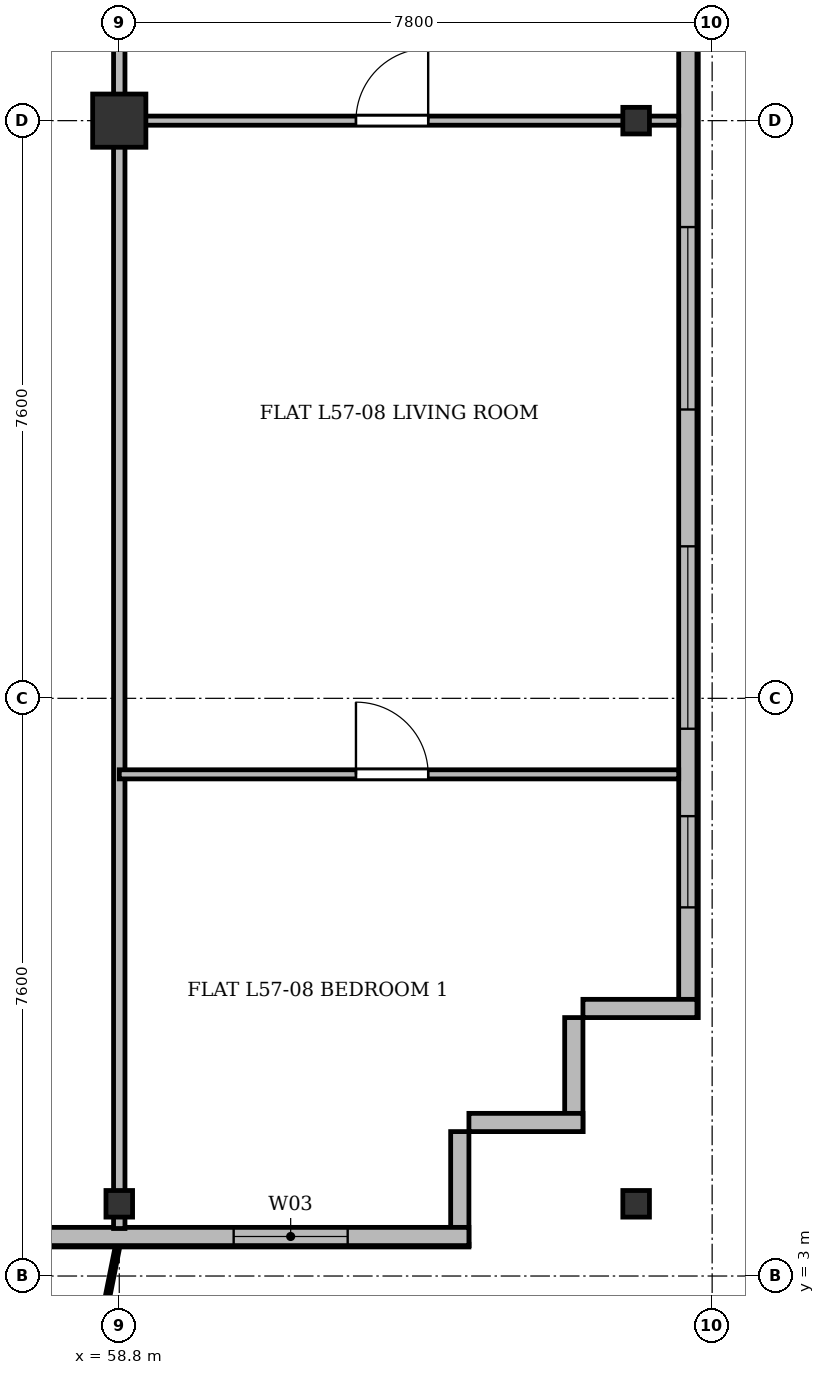
"""IFC4 building model, lengths in metres.
Left out: names, types, materials, properties, quantities, classifications, styles, units other than length and angle.
Written with IfcOpenShell. Run it as: python <this file> out.ifc"""

import sys

from ifc_helpers import new_model, si_unit, direction, frame, frame_2d, origin, origin_2d, place, context, subcontext, project, spatial, rectangle, i_section, extrude, source, transform, mapped, element, fill, save


model = new_model("IFC4")
c1 = context("Model", 3, precision=1e-05, world=origin(), true_north=direction((0.0, 1.0)))
c2 = subcontext(c1, "Body", "Model", "MODEL_VIEW")
j1 = project(units=[si_unit("LENGTHUNIT", "METRE"), si_unit("PLANEANGLEUNIT", "RADIAN")], contexts=[c1])
p1 = place(None, origin())
s1 = spatial("IfcSite", under=j1, at=p1, CompositionType="ELEMENT")
p2 = place(p1, origin())
s2 = spatial("IfcBuilding", under=s1, at=p2, CompositionType="ELEMENT")
p3 = place(p2, frame((0.0, 0.0, 219.3)))
s3 = spatial("IfcBuildingStorey", under=s2, at=p3, CompositionType="ELEMENT", Elevation=219.3)
m1 = source(origin(), c2, "Body", "SweptSolid", [
    extrude(i_section(OverallWidth=0.35, OverallDepth=0.35, WebThickness=0.018, FlangeThickness=0.028, at=origin_2d()), origin(), (0.0, 0.0, 1.0), 3.6),
])
p4 = place(p3, frame((58.8, 3.95, 0.0), z_axis=(0.0, 0.0, 1.0), x_axis=(1.0, 0.0, 0.0)))
e1 = element("IfcColumn", 1, at=p4, inside=s3, PredefinedType="COLUMN", context=c2, shape_type="MappedRepresentation", body=[
    mapped(m1, transform((0.0, 0.0, 0.0), x_axis=(1.0, 0.0, 0.0), y_axis=(0.0, 1.0, 0.0), z_axis=(0.0, 0.0, 1.0), scale=1.0)),
])
m2 = source(origin(), c2, "Body", "SweptSolid", [
    extrude(rectangle(XDim=0.7, YDim=0.7, at=origin_2d()), origin(), (0.0, 0.0, 1.0), 3.6),
])
p5 = place(p3, frame((58.8, 18.2, 0.0), z_axis=(0.0, 0.0, 1.0), x_axis=(1.0, 0.0, 0.0)))
e2 = element("IfcColumn", 2, at=p5, inside=s3, PredefinedType="COLUMN", context=c2, shape_type="MappedRepresentation", body=[
    mapped(m2, transform((0.0, 0.0, 0.0), x_axis=(1.0, 0.0, 0.0), y_axis=(0.0, 1.0, 0.0), z_axis=(0.0, 0.0, 1.0), scale=1.0)),
])
for number, where, z_axis, x_axis in (
    (3, (65.6, 3.95, 0.0), (0.0, 0.0, 1.0), (1.0, 0.0, 0.0)),
    (4, (65.6, 18.2, 0.0), (0.0, 0.0, 1.0), (1.0, 0.0, 0.0)),
):
    element("IfcColumn", number, at=place(p3, frame(where, z_axis=z_axis, x_axis=x_axis)), inside=s3, PredefinedType="COLUMN", context=c2, shape_type="MappedRepresentation", body=[
        mapped(m1, transform((0.0, 0.0, 0.0), x_axis=(1.0, 0.0, 0.0), y_axis=(0.0, 1.0, 0.0), z_axis=(0.0, 0.0, 1.0), scale=1.0)),
    ])
p6 = place(p3, frame((66.28, 45.5, 0.0), z_axis=(0.0, 0.0, 1.0), x_axis=(0.0, -1.0, 0.0)))
e5 = element("IfcWall", 5, at=p6, inside=s3, PredefinedType="SOLIDWALL", context=c2, shape_type="SweptSolid", body=[
    extrude(rectangle(XDim=39.1, YDim=0.24, at=frame_2d((19.55, 0.0))), origin(), (0.0, 0.0, 1.0), 3.36),
])
p7 = place(p6, frame((36.45, 0.0, 0.92)))
e6 = element("IfcOpeningElement", 6, at=p7, cuts=e5, PredefinedType="OPENING", context=c2, shape_type="SweptSolid", body=[
    extrude(rectangle(XDim=1.2, YDim=1.65, at=frame_2d((0.6, 0.825))), frame((0.0, 0.13, 0.0), z_axis=(0.0, -1.0, 0.0), x_axis=(1.0, 0.0, 0.0)), (0.0, 0.0, 1.0), 0.26),
])
p8 = place(p6, frame((32.9, 0.0, 0.92)))
e7 = element("IfcOpeningElement", 7, at=p8, cuts=e5, PredefinedType="OPENING", context=c2, shape_type="SweptSolid", body=[
    extrude(rectangle(XDim=2.4, YDim=2.1, at=frame_2d((1.2, 1.05))), frame((0.0, 0.13, 0.0), z_axis=(0.0, -1.0, 0.0), x_axis=(1.0, 0.0, 0.0)), (0.0, 0.0, 1.0), 0.26),
])
p9 = place(p6, frame((28.7, 0.0, 0.92)))
e8 = element("IfcOpeningElement", 8, at=p9, cuts=e5, PredefinedType="OPENING", context=c2, shape_type="SweptSolid", body=[
    extrude(rectangle(XDim=2.4, YDim=2.1, at=frame_2d((1.2, 1.05))), frame((0.0, 0.13, 0.0), z_axis=(0.0, -1.0, 0.0), x_axis=(1.0, 0.0, 0.0)), (0.0, 0.0, 1.0), 0.26),
])
p10 = place(p6, frame((21.5, 0.0, 0.92)))
e9 = element("IfcOpeningElement", 9, at=p10, cuts=e5, PredefinedType="OPENING", context=c2, shape_type="SweptSolid", body=[
    extrude(rectangle(XDim=2.4, YDim=2.1, at=frame_2d((1.2, 1.05))), frame((0.0, 0.13, 0.0), z_axis=(0.0, -1.0, 0.0), x_axis=(1.0, 0.0, 0.0)), (0.0, 0.0, 1.0), 0.26),
])
p11 = place(p6, frame((7.5, 0.0, 0.92)))
e10 = element("IfcOpeningElement", 10, at=p11, cuts=e5, PredefinedType="OPENING", context=c2, shape_type="SweptSolid", body=[
    extrude(rectangle(XDim=2.4, YDim=2.1, at=frame_2d((1.2, 1.05))), frame((0.0, 0.13, 0.0), z_axis=(0.0, -1.0, 0.0), x_axis=(1.0, 0.0, 0.0)), (0.0, 0.0, 1.0), 0.26),
])
p12 = place(p6, frame((4.5, 0.0, 0.92)))
e11 = element("IfcOpeningElement", 11, at=p12, cuts=e5, PredefinedType="OPENING", context=c2, shape_type="SweptSolid", body=[
    extrude(rectangle(XDim=1.2, YDim=1.65, at=frame_2d((0.6, 0.825))), frame((0.0, 0.13, 0.0), z_axis=(0.0, -1.0, 0.0), x_axis=(1.0, 0.0, 0.0)), (0.0, 0.0, 1.0), 0.26),
])
p13 = place(p6, frame((1.15, 0.0, 0.92)))
e12 = element("IfcOpeningElement", 12, at=p13, cuts=e5, PredefinedType="OPENING", context=c2, shape_type="SweptSolid", body=[
    extrude(rectangle(XDim=1.2, YDim=1.65, at=frame_2d((0.6, 0.825))), frame((0.0, 0.13, 0.0), z_axis=(0.0, -1.0, 0.0), x_axis=(1.0, 0.0, 0.0)), (0.0, 0.0, 1.0), 0.26),
])
p14 = place(p3, frame((66.4, 6.52, 0.0), z_axis=(0.0, 0.0, 1.0), x_axis=(-1.0, 0.0, 0.0)))
e13 = element("IfcWall", 13, at=p14, inside=s3, PredefinedType="SOLIDWALL", context=c2, shape_type="SweptSolid", body=[
    extrude(rectangle(XDim=1.5, YDim=0.24, at=frame_2d((0.75, 0.0))), origin(), (0.0, 0.0, 1.0), 2.86),
])
for number, where, z_axis, x_axis in (
    (14, (64.78, 6.4, 0.0), (0.0, 0.0, 1.0), (0.0, -1.0, 0.0)),
    (15, (64.9, 5.02, 0.0), (0.0, 0.0, 1.0), (-1.0, 0.0, 0.0)),
):
    element("IfcWall", number, at=place(p3, frame(where, z_axis=z_axis, x_axis=x_axis)), inside=s3, PredefinedType="SOLIDWALL", context=c2, shape_type="SweptSolid", body=[
        extrude(rectangle(XDim=1.5, YDim=0.24, at=frame_2d((0.75, 0.0))), origin(), (0.0, 0.0, 1.0), 3.36),
    ])
p15 = place(p3, frame((63.28, 4.9, 0.0), z_axis=(0.0, 0.0, 1.0), x_axis=(0.0, -1.0, 0.0)))
e16 = element("IfcWall", 16, at=p15, inside=s3, PredefinedType="SOLIDWALL", context=c2, shape_type="SweptSolid", body=[
    extrude(rectangle(XDim=1.5, YDim=0.24, at=frame_2d((0.75, 0.0))), origin(), (0.0, 0.0, 1.0), 2.91),
])
p16 = place(p3, frame((63.4, 3.52, 0.0), z_axis=(0.0, 0.0, 1.0), x_axis=(-1.0, 0.0, 0.0)))
e17 = element("IfcWall", 17, at=p16, inside=s3, PredefinedType="SOLIDWALL", context=c2, shape_type="SweptSolid", body=[
    extrude(rectangle(XDim=52.4, YDim=0.24, at=frame_2d((26.2, 0.0))), origin(), (0.0, 0.0, 1.0), 3.36),
])
p17 = place(p16, frame((1.595, 0.0, 0.9)))
e18 = element("IfcOpeningElement", 18, at=p17, cuts=e17, PredefinedType="OPENING", context=c2, shape_type="SweptSolid", body=[
    extrude(rectangle(XDim=1.5, YDim=1.75, at=frame_2d((0.75, 0.875))), frame((0.0, 0.13, 0.0), z_axis=(0.0, -1.0, 0.0), x_axis=(1.0, 0.0, 0.0)), (0.0, 0.0, 1.0), 0.26),
])
p18 = place(p16, frame((7.5, 0.0, 0.9)))
e19 = element("IfcOpeningElement", 19, at=p18, cuts=e17, PredefinedType="OPENING", context=c2, shape_type="SweptSolid", body=[
    extrude(rectangle(XDim=2.0, YDim=1.95, at=frame_2d((1.0, 0.975))), frame((0.0, 0.13, 0.0), z_axis=(0.0, -1.0, 0.0), x_axis=(1.0, 0.0, 0.0)), (0.0, 0.0, 1.0), 0.26),
])
p19 = place(p16, frame((13.42, 0.0, 0.0)))
e20 = element("IfcOpeningElement", 20, at=p19, cuts=e17, PredefinedType="OPENING", context=c2, shape_type="SweptSolid", body=[
    extrude(rectangle(XDim=1.2, YDim=2.2, at=frame_2d((0.6, 1.1))), frame((0.0, 0.13, 0.0), z_axis=(0.0, -1.0, 0.0), x_axis=(1.0, 0.0, 0.0)), (0.0, 0.0, 1.0), 0.26),
])
p20 = place(p16, frame((15.1, 0.0, 0.9)))
e21 = element("IfcOpeningElement", 21, at=p20, cuts=e17, PredefinedType="OPENING", context=c2, shape_type="SweptSolid", body=[
    extrude(rectangle(XDim=1.8, YDim=1.8, at=frame_2d((0.9, 0.9))), frame((0.0, 0.13, 0.0), z_axis=(0.0, -1.0, 0.0), x_axis=(1.0, 0.0, 0.0)), (0.0, 0.0, 1.0), 0.26),
])
p21 = place(p16, frame((17.65, 0.0, 0.9)))
e22 = element("IfcOpeningElement", 22, at=p21, cuts=e17, PredefinedType="OPENING", context=c2, shape_type="SweptSolid", body=[
    extrude(rectangle(XDim=1.5, YDim=1.75, at=frame_2d((0.75, 0.875))), frame((0.0, 0.13, 0.0), z_axis=(0.0, -1.0, 0.0), x_axis=(1.0, 0.0, 0.0)), (0.0, 0.0, 1.0), 0.26),
])
p22 = place(p16, frame((20.5, 0.0, 0.9)))
e23 = element("IfcOpeningElement", 23, at=p22, cuts=e17, PredefinedType="OPENING", context=c2, shape_type="SweptSolid", body=[
    extrude(rectangle(XDim=1.5, YDim=1.75, at=frame_2d((0.75, 0.875))), frame((0.0, 0.13, 0.0), z_axis=(0.0, -1.0, 0.0), x_axis=(1.0, 0.0, 0.0)), (0.0, 0.0, 1.0), 0.26),
])
p23 = place(p16, frame((23.55, 0.0, 0.9)))
e24 = element("IfcOpeningElement", 24, at=p23, cuts=e17, PredefinedType="OPENING", context=c2, shape_type="SweptSolid", body=[
    extrude(rectangle(XDim=2.0, YDim=1.95, at=frame_2d((1.0, 0.975))), frame((0.0, 0.13, 0.0), z_axis=(0.0, -1.0, 0.0), x_axis=(1.0, 0.0, 0.0)), (0.0, 0.0, 1.0), 0.26),
])
p24 = place(p16, frame((28.675, 0.0, 0.9)))
e25 = element("IfcOpeningElement", 25, at=p24, cuts=e17, PredefinedType="OPENING", context=c2, shape_type="SweptSolid", body=[
    extrude(rectangle(XDim=1.65, YDim=1.85, at=frame_2d((0.825, 0.925))), frame((0.0, 0.13, 0.0), z_axis=(0.0, -1.0, 0.0), x_axis=(1.0, 0.0, 0.0)), (0.0, 0.0, 1.0), 0.26),
])
p25 = place(p16, frame((33.7, 0.0, 0.9)))
e26 = element("IfcOpeningElement", 26, at=p25, cuts=e17, PredefinedType="OPENING", context=c2, shape_type="SweptSolid", body=[
    extrude(rectangle(XDim=1.8, YDim=1.8, at=frame_2d((0.9, 0.9))), frame((0.0, 0.13, 0.0), z_axis=(0.0, -1.0, 0.0), x_axis=(1.0, 0.0, 0.0)), (0.0, 0.0, 1.0), 0.26),
])
p26 = place(p16, frame((37.1, 0.0, 0.9)))
e27 = element("IfcOpeningElement", 27, at=p26, cuts=e17, PredefinedType="OPENING", context=c2, shape_type="SweptSolid", body=[
    extrude(rectangle(XDim=2.2, YDim=1.8, at=frame_2d((1.1, 0.9))), frame((0.0, 0.13, 0.0), z_axis=(0.0, -1.0, 0.0), x_axis=(1.0, 0.0, 0.0)), (0.0, 0.0, 1.0), 0.26),
])
p27 = place(p16, frame((41.09, 0.0, 0.0)))
e28 = element("IfcOpeningElement", 28, at=p27, cuts=e17, PredefinedType="OPENING", context=c2, shape_type="SweptSolid", body=[
    extrude(rectangle(XDim=1.2, YDim=2.2, at=frame_2d((0.6, 1.1))), frame((0.0, 0.13, 0.0), z_axis=(0.0, -1.0, 0.0), x_axis=(1.0, 0.0, 0.0)), (0.0, 0.0, 1.0), 0.26),
])
p28 = place(p16, frame((42.9, 0.0, 0.9)))
e29 = element("IfcOpeningElement", 29, at=p28, cuts=e17, PredefinedType="OPENING", context=c2, shape_type="SweptSolid", body=[
    extrude(rectangle(XDim=2.0, YDim=1.95, at=frame_2d((1.0, 0.975))), frame((0.0, 0.13, 0.0), z_axis=(0.0, -1.0, 0.0), x_axis=(1.0, 0.0, 0.0)), (0.0, 0.0, 1.0), 0.26),
])
p29 = place(p16, frame((45.675, 0.0, 0.9)))
e30 = element("IfcOpeningElement", 30, at=p29, cuts=e17, PredefinedType="OPENING", context=c2, shape_type="SweptSolid", body=[
    extrude(rectangle(XDim=1.65, YDim=1.85, at=frame_2d((0.825, 0.925))), frame((0.0, 0.13, 0.0), z_axis=(0.0, -1.0, 0.0), x_axis=(1.0, 0.0, 0.0)), (0.0, 0.0, 1.0), 0.26),
])
p30 = place(p16, frame((49.155, 0.0, 0.9)))
e31 = element("IfcOpeningElement", 31, at=p30, cuts=e17, PredefinedType="OPENING", context=c2, shape_type="SweptSolid", body=[
    extrude(rectangle(XDim=1.8, YDim=1.8, at=frame_2d((0.9, 0.9))), frame((0.0, 0.13, 0.0), z_axis=(0.0, -1.0, 0.0), x_axis=(1.0, 0.0, 0.0)), (0.0, 0.0, 1.0), 0.26),
])
p31 = place(p3, frame((58.8, 3.625, 0.0), z_axis=(0.0, 0.0, 1.0), x_axis=(0.0, 1.0, 0.0)))
e32 = element("IfcWall", 32, at=p31, inside=s3, PredefinedType="PARTITIONING", context=c2, shape_type="SweptSolid", body=[
    extrude(rectangle(XDim=27.375, YDim=0.15, at=frame_2d((13.688, 0.0))), origin(), (0.0, 0.0, 1.0), 2.86),
])
p32 = place(p3, frame((58.8, 18.2, 0.0), z_axis=(0.0, 0.0, 1.0), x_axis=(1.0, 0.0, 0.0)))
e33 = element("IfcWall", 33, at=p32, inside=s3, PredefinedType="PARTITIONING", context=c2, shape_type="SweptSolid", body=[
    extrude(rectangle(XDim=7.36, YDim=0.12, at=frame_2d((3.68, 0.0))), origin(), (0.0, 0.0, 1.0), 2.91),
])
p33 = place(p32, frame((3.114, 0.0, 0.0)))
e34 = element("IfcOpeningElement", 34, at=p33, cuts=e33, PredefinedType="OPENING", context=c2, shape_type="SweptSolid", body=[
    extrude(rectangle(XDim=0.95, YDim=2.15, at=frame_2d((0.475, 1.075))), frame((0.0, 0.07, 0.0), z_axis=(0.0, -1.0, 0.0), x_axis=(1.0, 0.0, 0.0)), (0.0, 0.0, 1.0), 0.14),
])
p34 = place(p3, frame((58.8, 9.6, 0.0), z_axis=(0.0, 0.0, 1.0), x_axis=(1.0, 0.0, 0.0)))
e35 = element("IfcWall", 35, at=p34, inside=s3, PredefinedType="PARTITIONING", context=c2, shape_type="SweptSolid", body=[
    extrude(rectangle(XDim=7.36, YDim=0.12, at=frame_2d((3.68, 0.0))), origin(), (0.0, 0.0, 1.0), 2.86),
])
p35 = place(p34, frame((3.114, 0.0, 0.0)))
e36 = element("IfcOpeningElement", 36, at=p35, cuts=e35, PredefinedType="OPENING", context=c2, shape_type="SweptSolid", body=[
    extrude(rectangle(XDim=0.95, YDim=2.15, at=frame_2d((0.475, 1.075))), frame((0.0, 0.07, 0.0), z_axis=(0.0, -1.0, 0.0), x_axis=(1.0, 0.0, 0.0)), (0.0, 0.0, 1.0), 0.14),
])
m3 = source(origin(), c2, "Body", "SweptSolid", [
    extrude(rectangle(XDim=1.2, YDim=1.65, at=frame_2d((0.6, 0.825))), frame((0.0, 0.03, 0.0), z_axis=(0.0, -1.0, 0.0), x_axis=(1.0, 0.0, 0.0)), (0.0, 0.0, 1.0), 0.06),
])
p36 = place(p7, origin())
e37 = element("IfcWindow", 37, at=p36, inside=s3, PartitioningType="SINGLE_PANEL", PredefinedType="WINDOW", context=c2, shape_type="MappedRepresentation", body=[
    mapped(m3, transform((0.0, 0.0, 0.0), x_axis=(1.0, 0.0, 0.0), y_axis=(0.0, 1.0, 0.0), z_axis=(0.0, 0.0, 1.0), scale=1.0)),
])
fill(e6, e37)
m4 = source(origin(), c2, "Body", "SweptSolid", [
    extrude(rectangle(XDim=2.4, YDim=2.1, at=frame_2d((1.2, 1.05))), frame((0.0, 0.03, 0.0), z_axis=(0.0, -1.0, 0.0), x_axis=(1.0, 0.0, 0.0)), (0.0, 0.0, 1.0), 0.06),
])
p37 = place(p8, origin())
e38 = element("IfcWindow", 38, at=p37, inside=s3, PartitioningType="SINGLE_PANEL", PredefinedType="WINDOW", context=c2, shape_type="MappedRepresentation", body=[
    mapped(m4, transform((0.0, 0.0, 0.0), x_axis=(1.0, 0.0, 0.0), y_axis=(0.0, 1.0, 0.0), z_axis=(0.0, 0.0, 1.0), scale=1.0)),
])
fill(e7, e38)
p38 = place(p9, origin())
e39 = element("IfcWindow", 39, at=p38, inside=s3, PartitioningType="SINGLE_PANEL", PredefinedType="WINDOW", context=c2, shape_type="MappedRepresentation", body=[
    mapped(m4, transform((0.0, 0.0, 0.0), x_axis=(1.0, 0.0, 0.0), y_axis=(0.0, 1.0, 0.0), z_axis=(0.0, 0.0, 1.0), scale=1.0)),
])
fill(e8, e39)
m5 = source(origin(), c2, "Body", "SweptSolid", [
    extrude(rectangle(XDim=1.5, YDim=1.75, at=frame_2d((0.75, 0.875))), frame((0.0, 0.03, 0.0), z_axis=(0.0, -1.0, 0.0), x_axis=(1.0, 0.0, 0.0)), (0.0, 0.0, 1.0), 0.06),
])
p39 = place(p17, origin())
e40 = element("IfcWindow", 40, at=p39, inside=s3, PartitioningType="SINGLE_PANEL", PredefinedType="WINDOW", context=c2, shape_type="MappedRepresentation", body=[
    mapped(m5, transform((0.0, 0.0, 0.0), x_axis=(1.0, 0.0, 0.0), y_axis=(0.0, 1.0, 0.0), z_axis=(0.0, 0.0, 1.0), scale=1.0)),
])
fill(e18, e40)
m6 = source(origin(), c2, "Body", "SweptSolid", [
    extrude(rectangle(XDim=0.95, YDim=2.15, at=frame_2d((0.475, 1.075))), frame((0.0, 0.025, 0.0), z_axis=(0.0, -1.0, 0.0), x_axis=(1.0, 0.0, 0.0)), (0.0, 0.0, 1.0), 0.05),
])
p40 = place(p33, origin())
e41 = element("IfcDoor", 41, at=p40, inside=s3, OperationType="SINGLE_SWING_RIGHT", PredefinedType="DOOR", context=c2, shape_type="MappedRepresentation", body=[
    mapped(m6, transform((0.0, 0.0, 0.0), x_axis=(1.0, 0.0, 0.0), y_axis=(0.0, 1.0, 0.0), z_axis=(0.0, 0.0, 1.0), scale=1.0)),
])
fill(e34, e41)
p41 = place(p35, origin())
e42 = element("IfcDoor", 42, at=p41, inside=s3, OperationType="SINGLE_SWING_LEFT", PredefinedType="DOOR", context=c2, shape_type="MappedRepresentation", body=[
    mapped(m6, transform((0.0, 0.0, 0.0), x_axis=(1.0, 0.0, 0.0), y_axis=(0.0, 1.0, 0.0), z_axis=(0.0, 0.0, 1.0), scale=1.0)),
])
fill(e36, e42)
save(model, sys.argv[1])
